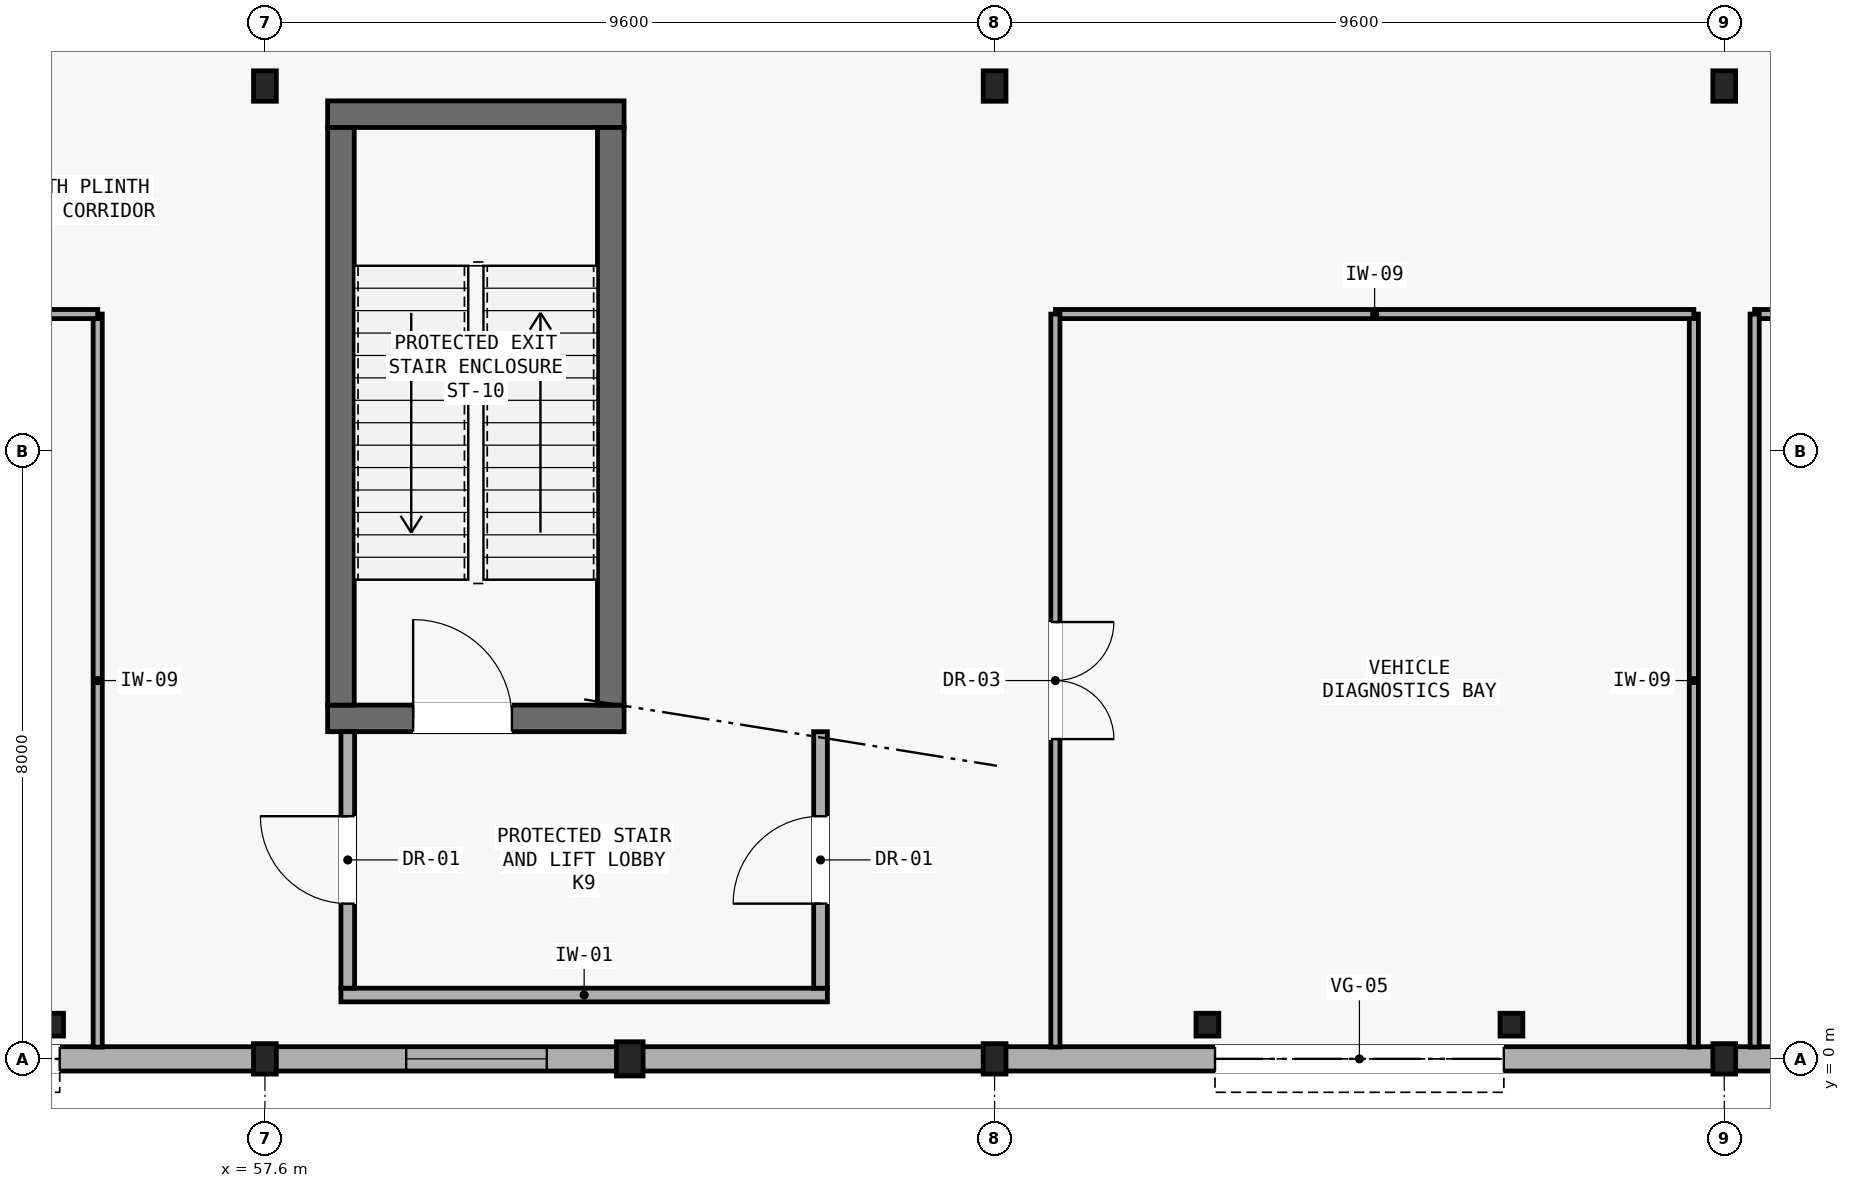
"""IFC4 building model, lengths in metres.
Left out: names, types, materials, properties, quantities, classifications, styles, units other than length and angle.
Written with IfcOpenShell. Run it as: python <this file> out.ifc"""

import sys

from ifc_helpers import new_model, si_unit, direction, frame, frame_2d, origin, origin_2d, place, context, subcontext, project, spatial, rectangle, i_section, extrude, element, fill, save


model = new_model("IFC4")
c1 = context("Model", 3, precision=1e-05, world=origin(), true_north=direction((0.0, 1.0)))
c2 = subcontext(c1, "Body", "Model", "MODEL_VIEW")
j1 = project(units=[si_unit("LENGTHUNIT", "METRE"), si_unit("PLANEANGLEUNIT", "RADIAN")], contexts=[c1])
p1 = place(None, origin())
s1 = spatial("IfcSite", under=j1, at=p1, CompositionType="ELEMENT")
p2 = place(p1, origin())
s2 = spatial("IfcBuilding", under=s1, at=p2, CompositionType="ELEMENT")
p3 = place(p2, origin())
s3 = spatial("IfcBuildingStorey", under=s2, at=p3, CompositionType="ELEMENT", Elevation=0.0)
for number, where, z_axis, x_axis in (
    (1, (57.6, 0.0, -0.27), (0.0, 0.0, 1.0), (1.0, 0.0, 0.0)),
    (2, (57.6, 12.8, -0.27), (0.0, 0.0, 1.0), (1.0, 0.0, 0.0)),
    (3, (67.2, 0.0, -0.27), (0.0, 0.0, 1.0), (1.0, 0.0, 0.0)),
    (4, (67.2, 12.8, -0.27), (0.0, 0.0, 1.0), (1.0, 0.0, 0.0)),
    (5, (76.8, 0.0, -0.27), (0.0, 0.0, 1.0), (1.0, 0.0, 0.0)),
    (6, (76.8, 12.8, -0.27), (0.0, 0.0, 1.0), (1.0, 0.0, 0.0)),
):
    element("IfcColumn", number, at=place(p3, frame(where, z_axis=z_axis, x_axis=x_axis)), inside=s3, PredefinedType="COLUMN", context=c2, shape_type="SweptSolid", body=[
        extrude(i_section(OverallWidth=0.3, OverallDepth=0.4, WebThickness=0.013, FlangeThickness=0.024, FilletRadius=0.027, at=origin_2d()), origin(), (0.0, 0.0, 1.0), 5.52),
    ])
p4 = place(p3, frame((62.4, 0.0, -0.27), z_axis=(0.0, 0.0, 1.0), x_axis=(1.0, 0.0, 0.0)))
e7 = element("IfcColumn", 7, at=p4, inside=s3, PredefinedType="PILASTER", context=c2, shape_type="SweptSolid", body=[
    extrude(rectangle(XDim=0.35, YDim=0.45, at=origin_2d()), origin(), (0.0, 0.0, 1.0), 5.27),
])
for number, where, z_axis, x_axis in (
    (8, (54.8, 0.45, -0.27), (0.0, 0.0, 1.0), (1.0, 0.0, 0.0)),
    (9, (70.0, 0.45, -0.27), (0.0, 0.0, 1.0), (1.0, 0.0, 0.0)),
    (10, (74.0, 0.45, -0.27), (0.0, 0.0, 1.0), (1.0, 0.0, 0.0)),
):
    element("IfcColumn", number, at=place(p3, frame(where, z_axis=z_axis, x_axis=x_axis)), inside=s3, PredefinedType="COLUMN", context=c2, shape_type="SweptSolid", body=[
        extrude(i_section(OverallWidth=0.3, OverallDepth=0.3, WebThickness=0.011, FlangeThickness=0.019, FilletRadius=0.027, at=origin_2d()), origin(), (0.0, 0.0, 1.0), 3.92),
    ])
p5 = place(p3, frame((48.009, 0.0, 0.0), z_axis=(0.0, 0.0, 1.0), x_axis=(1.0, 0.0, 0.0)))
e11 = element("IfcWall", 11, at=p5, inside=s3, PredefinedType="SOLIDWALL", context=c2, shape_type="SweptSolid", body=[
    extrude(rectangle(XDim=9.583, YDim=0.32, at=frame_2d((4.791, 0.0))), origin(), (0.0, 0.0, 1.0), 4.67),
])
p6 = place(p5, frame((2.691, 0.0, 0.0)))
e12 = element("IfcOpeningElement", 12, at=p6, cuts=e11, PredefinedType="OPENING", context=c2, shape_type="SweptSolid", body=[
    extrude(rectangle(XDim=4.2, YDim=3.0, at=frame_2d((2.1, 1.5))), frame((0.0, 0.17, 0.0), z_axis=(0.0, -1.0, 0.0), x_axis=(1.0, 0.0, 0.0)), (0.0, 0.0, 1.0), 0.34),
])
p7 = place(p3, frame((57.609, 0.0, 0.0), z_axis=(0.0, 0.0, 1.0), x_axis=(1.0, 0.0, 0.0)))
e13 = element("IfcWall", 13, at=p7, inside=s3, PredefinedType="SOLIDWALL", context=c2, shape_type="SweptSolid", body=[
    extrude(rectangle(XDim=9.583, YDim=0.32, at=frame_2d((4.791, 0.0))), origin(), (0.0, 0.0, 1.0), 4.67),
])
p8 = place(p7, frame((1.85, 0.0, 0.9)))
e14 = element("IfcOpeningElement", 14, at=p8, cuts=e13, PredefinedType="OPENING", context=c2, shape_type="SweptSolid", body=[
    extrude(rectangle(XDim=1.85, YDim=1.3, at=frame_2d((0.925, 0.65))), frame((0.0, 0.17, 0.0), z_axis=(0.0, -1.0, 0.0), x_axis=(1.0, 0.0, 0.0)), (0.0, 0.0, 1.0), 0.34),
])
p9 = place(p3, frame((67.209, 0.0, 0.0), z_axis=(0.0, 0.0, 1.0), x_axis=(1.0, 0.0, 0.0)))
e15 = element("IfcWall", 15, at=p9, inside=s3, PredefinedType="SOLIDWALL", context=c2, shape_type="SweptSolid", body=[
    extrude(rectangle(XDim=9.583, YDim=0.32, at=frame_2d((4.791, 0.0))), origin(), (0.0, 0.0, 1.0), 4.67),
])
p10 = place(p9, frame((2.891, 0.0, 0.0)))
e16 = element("IfcOpeningElement", 16, at=p10, cuts=e15, PredefinedType="OPENING", context=c2, shape_type="SweptSolid", body=[
    extrude(rectangle(XDim=3.8, YDim=2.95, at=frame_2d((1.9, 1.475))), frame((0.0, 0.17, 0.0), z_axis=(0.0, -1.0, 0.0), x_axis=(1.0, 0.0, 0.0)), (0.0, 0.0, 1.0), 0.34),
])
p11 = place(p3, frame((76.809, 0.0, 0.0), z_axis=(0.0, 0.0, 1.0), x_axis=(1.0, 0.0, 0.0)))
e17 = element("IfcWall", 17, at=p11, inside=s3, PredefinedType="SOLIDWALL", context=c2, shape_type="SweptSolid", body=[
    extrude(rectangle(XDim=9.583, YDim=0.32, at=frame_2d((4.791, 0.0))), origin(), (0.0, 0.0, 1.0), 4.67),
])
p12 = place(p3, frame((58.425, 4.48, -0.27), z_axis=(0.0, 0.0, 1.0), x_axis=(1.0, 0.0, 0.0)))
e18 = element("IfcWall", 18, at=p12, inside=s3, PredefinedType="SHEAR", context=c2, shape_type="SweptSolid", body=[
    extrude(rectangle(XDim=3.9, YDim=0.35, at=frame_2d((1.95, 0.0))), origin(), (0.0, 0.0, 1.0), 5.27),
])
p13 = place(p12, frame((1.125, 0.0, 0.27)))
e19 = element("IfcOpeningElement", 19, at=p13, cuts=e18, PredefinedType="OPENING", context=c2, shape_type="SweptSolid", body=[
    extrude(rectangle(XDim=1.3, YDim=2.15, at=frame_2d((0.65, 1.075))), frame((0.0, 0.185, 0.0), z_axis=(0.0, -1.0, 0.0), x_axis=(1.0, 0.0, 0.0)), (0.0, 0.0, 1.0), 0.37),
])
p14 = place(p3, frame((58.425, 12.43, -0.27), z_axis=(0.0, 0.0, 1.0), x_axis=(1.0, 0.0, 0.0)))
e20 = element("IfcWall", 20, at=p14, inside=s3, PredefinedType="SHEAR", context=c2, shape_type="SweptSolid", body=[
    extrude(rectangle(XDim=3.9, YDim=0.35, at=frame_2d((1.95, 0.0))), origin(), (0.0, 0.0, 1.0), 5.27),
])
for number, where, z_axis, x_axis in (
    (21, (58.6, 4.655, -0.27), (0.0, 0.0, 1.0), (0.0, 1.0, 0.0)),
    (22, (62.15, 4.655, -0.27), (0.0, 0.0, 1.0), (0.0, 1.0, 0.0)),
):
    element("IfcWall", number, at=place(p3, frame(where, z_axis=z_axis, x_axis=x_axis)), inside=s3, PredefinedType="SHEAR", context=c2, shape_type="SweptSolid", body=[
        extrude(rectangle(XDim=7.6, YDim=0.35, at=frame_2d((3.8, 0.0))), origin(), (0.0, 0.0, 1.0), 5.27),
    ])
p15 = place(p3, frame((58.6, 0.84, 0.0), z_axis=(0.0, 0.0, 1.0), x_axis=(1.0, 0.0, 0.0)))
e23 = element("IfcWall", 23, at=p15, inside=s3, PredefinedType="PARTITIONING", context=c2, shape_type="SweptSolid", body=[
    extrude(rectangle(XDim=6.4, YDim=0.18, at=frame_2d((3.2, 0.0))), origin(), (0.0, 0.0, 1.0), 5.0),
])
p16 = place(p3, frame((58.69, 0.93, 0.0), z_axis=(0.0, 0.0, 1.0), x_axis=(0.0, 1.0, 0.0)))
e24 = element("IfcWall", 24, at=p16, inside=s3, PredefinedType="PARTITIONING", context=c2, shape_type="SweptSolid", body=[
    extrude(rectangle(XDim=3.375, YDim=0.18, at=frame_2d((1.688, 0.0))), origin(), (0.0, 0.0, 1.0), 5.0),
])
p17 = place(p16, frame((1.113, 0.0, 0.0)))
e25 = element("IfcOpeningElement", 25, at=p17, cuts=e24, PredefinedType="OPENING", context=c2, shape_type="SweptSolid", body=[
    extrude(rectangle(XDim=1.15, YDim=2.15, at=frame_2d((0.575, 1.075))), frame((0.0, 0.1, 0.0), z_axis=(0.0, -1.0, 0.0), x_axis=(1.0, 0.0, 0.0)), (0.0, 0.0, 1.0), 0.2),
])
p18 = place(p3, frame((64.91, 0.93, 0.0), z_axis=(0.0, 0.0, 1.0), x_axis=(0.0, 1.0, 0.0)))
e26 = element("IfcWall", 26, at=p18, inside=s3, PredefinedType="PARTITIONING", context=c2, shape_type="SweptSolid", body=[
    extrude(rectangle(XDim=3.375, YDim=0.18, at=frame_2d((1.688, 0.0))), origin(), (0.0, 0.0, 1.0), 5.0),
])
p19 = place(p18, frame((1.113, 0.0, 0.0)))
e27 = element("IfcOpeningElement", 27, at=p19, cuts=e26, PredefinedType="OPENING", context=c2, shape_type="SweptSolid", body=[
    extrude(rectangle(XDim=1.15, YDim=2.15, at=frame_2d((0.575, 1.075))), frame((0.0, 0.1, 0.0), z_axis=(0.0, -1.0, 0.0), x_axis=(1.0, 0.0, 0.0)), (0.0, 0.0, 1.0), 0.2),
])
p20 = place(p3, frame((55.4, 0.155, 0.0), z_axis=(0.0, 0.0, 1.0), x_axis=(0.0, 1.0, 0.0)))
e28 = element("IfcWall", 28, at=p20, inside=s3, PredefinedType="PARTITIONING", context=c2, shape_type="SweptSolid", body=[
    extrude(rectangle(XDim=9.645, YDim=0.12, at=frame_2d((4.823, 0.0))), origin(), (0.0, 0.0, 1.0), 5.0),
])
p21 = place(p3, frame((55.4, 9.8, 0.0), z_axis=(0.0, 0.0, 1.0), x_axis=(-1.0, 0.0, 0.0)))
e29 = element("IfcWall", 29, at=p21, inside=s3, PredefinedType="PARTITIONING", context=c2, shape_type="SweptSolid", body=[
    extrude(rectangle(XDim=16.6, YDim=0.12, at=frame_2d((8.3, 0.0))), origin(), (0.0, 0.0, 1.0), 5.0),
])
p22 = place(p21, frame((7.53, 0.0, 0.0)))
e30 = element("IfcOpeningElement", 30, at=p22, cuts=e29, PredefinedType="OPENING", context=c2, shape_type="SweptSolid", body=[
    extrude(rectangle(XDim=1.54, YDim=2.2, at=frame_2d((0.77, 1.1))), frame((0.0, 0.07, 0.0), z_axis=(0.0, -1.0, 0.0), x_axis=(1.0, 0.0, 0.0)), (0.0, 0.0, 1.0), 0.14),
])
p23 = place(p3, frame((76.4, 0.155, 0.0), z_axis=(0.0, 0.0, 1.0), x_axis=(0.0, 1.0, 0.0)))
e31 = element("IfcWall", 31, at=p23, inside=s3, PredefinedType="PARTITIONING", context=c2, shape_type="SweptSolid", body=[
    extrude(rectangle(XDim=9.645, YDim=0.12, at=frame_2d((4.823, 0.0))), origin(), (0.0, 0.0, 1.0), 5.0),
])
p24 = place(p3, frame((76.4, 9.8, 0.0), z_axis=(0.0, 0.0, 1.0), x_axis=(-1.0, 0.0, 0.0)))
e32 = element("IfcWall", 32, at=p24, inside=s3, PredefinedType="PARTITIONING", context=c2, shape_type="SweptSolid", body=[
    extrude(rectangle(XDim=8.4, YDim=0.12, at=frame_2d((4.2, 0.0))), origin(), (0.0, 0.0, 1.0), 5.0),
])
p25 = place(p3, frame((68.0, 9.8, 0.0), z_axis=(0.0, 0.0, 1.0), x_axis=(0.0, -1.0, 0.0)))
e33 = element("IfcWall", 33, at=p25, inside=s3, PredefinedType="PARTITIONING", context=c2, shape_type="SweptSolid", body=[
    extrude(rectangle(XDim=9.645, YDim=0.12, at=frame_2d((4.823, 0.0))), origin(), (0.0, 0.0, 1.0), 5.0),
])
p26 = place(p25, frame((4.052, 0.0, 0.0)))
e34 = element("IfcOpeningElement", 34, at=p26, cuts=e33, PredefinedType="OPENING", context=c2, shape_type="SweptSolid", body=[
    extrude(rectangle(XDim=1.54, YDim=2.2, at=frame_2d((0.77, 1.1))), frame((0.0, 0.07, 0.0), z_axis=(0.0, -1.0, 0.0), x_axis=(1.0, 0.0, 0.0)), (0.0, 0.0, 1.0), 0.14),
])
p27 = place(p3, frame((116.4, 9.8, 0.0), z_axis=(0.0, 0.0, 1.0), x_axis=(-1.0, 0.0, 0.0)))
e35 = element("IfcWall", 35, at=p27, inside=s3, PredefinedType="PARTITIONING", context=c2, shape_type="SweptSolid", body=[
    extrude(rectangle(XDim=39.2, YDim=0.12, at=frame_2d((19.6, 0.0))), origin(), (0.0, 0.0, 1.0), 5.0),
])
p28 = place(p27, frame((18.83, 0.0, 0.0)))
e36 = element("IfcOpeningElement", 36, at=p28, cuts=e35, PredefinedType="OPENING", context=c2, shape_type="SweptSolid", body=[
    extrude(rectangle(XDim=1.54, YDim=2.2, at=frame_2d((0.77, 1.1))), frame((0.0, 0.07, 0.0), z_axis=(0.0, -1.0, 0.0), x_axis=(1.0, 0.0, 0.0)), (0.0, 0.0, 1.0), 0.14),
])
p29 = place(p3, frame((77.2, 9.8, 0.0), z_axis=(0.0, 0.0, 1.0), x_axis=(0.0, -1.0, 0.0)))
e37 = element("IfcWall", 37, at=p29, inside=s3, PredefinedType="PARTITIONING", context=c2, shape_type="SweptSolid", body=[
    extrude(rectangle(XDim=9.645, YDim=0.12, at=frame_2d((4.823, 0.0))), origin(), (0.0, 0.0, 1.0), 5.0),
])
p30 = place(p6, frame((4.2, 0.0, 0.0), z_axis=(0.0, 0.0, 1.0), x_axis=(-1.0, 0.0, 0.0)))
e38 = element("IfcDoor", 38, at=p30, inside=s3, OperationType="SINGLE_SWING_LEFT", PredefinedType="USERDEFINED", context=c2, shape_type="SweptSolid", body=[
    extrude(rectangle(XDim=4.2, YDim=3.0, at=frame_2d((2.1, 1.5))), frame((0.0, 0.025, 0.0), z_axis=(0.0, -1.0, 0.0), x_axis=(1.0, 0.0, 0.0)), (0.0, 0.0, 1.0), 0.05),
])
fill(e12, e38)
p31 = place(p8, origin())
e39 = element("IfcWindow", 39, at=p31, inside=s3, PartitioningType="SINGLE_PANEL", PredefinedType="WINDOW", context=c2, shape_type="SweptSolid", body=[
    extrude(rectangle(XDim=1.85, YDim=1.3, at=frame_2d((0.925, 0.65))), frame((0.0, 0.03, 0.0), z_axis=(0.0, -1.0, 0.0), x_axis=(1.0, 0.0, 0.0)), (0.0, 0.0, 1.0), 0.06),
])
fill(e14, e39)
p32 = place(p10, frame((3.8, 0.0, 0.0), z_axis=(0.0, 0.0, 1.0), x_axis=(-1.0, 0.0, 0.0)))
e40 = element("IfcDoor", 40, at=p32, inside=s3, OperationType="SINGLE_SWING_LEFT", PredefinedType="USERDEFINED", context=c2, shape_type="SweptSolid", body=[
    extrude(rectangle(XDim=3.8, YDim=2.95, at=frame_2d((1.9, 1.475))), frame((0.0, 0.025, 0.0), z_axis=(0.0, -1.0, 0.0), x_axis=(1.0, 0.0, 0.0)), (0.0, 0.0, 1.0), 0.05),
])
fill(e16, e40)
p33 = place(p13, origin())
e41 = element("IfcDoor", 41, at=p33, inside=s3, OperationType="SINGLE_SWING_LEFT", PredefinedType="DOOR", context=c2, shape_type="SweptSolid", body=[
    extrude(rectangle(XDim=1.3, YDim=2.15, at=frame_2d((0.65, 1.075))), frame((0.0, 0.025, 0.0), z_axis=(0.0, -1.0, 0.0), x_axis=(1.0, 0.0, 0.0)), (0.0, 0.0, 1.0), 0.05),
])
fill(e19, e41)
p34 = place(p17, origin())
e42 = element("IfcDoor", 42, at=p34, inside=s3, OperationType="SINGLE_SWING_RIGHT", PredefinedType="DOOR", context=c2, shape_type="SweptSolid", body=[
    extrude(rectangle(XDim=1.15, YDim=2.15, at=frame_2d((0.575, 1.075))), frame((0.0, 0.025, 0.0), z_axis=(0.0, -1.0, 0.0), x_axis=(1.0, 0.0, 0.0)), (0.0, 0.0, 1.0), 0.05),
])
fill(e25, e42)
p35 = place(p19, origin())
e43 = element("IfcDoor", 43, at=p35, inside=s3, OperationType="SINGLE_SWING_LEFT", PredefinedType="DOOR", context=c2, shape_type="SweptSolid", body=[
    extrude(rectangle(XDim=1.15, YDim=2.15, at=frame_2d((0.575, 1.075))), frame((0.0, 0.025, 0.0), z_axis=(0.0, -1.0, 0.0), x_axis=(1.0, 0.0, 0.0)), (0.0, 0.0, 1.0), 0.05),
])
fill(e27, e43)
p36 = place(p26, origin())
e44 = element("IfcDoor", 44, at=p36, inside=s3, OperationType="DOUBLE_DOOR_SINGLE_SWING", PredefinedType="DOOR", context=c2, shape_type="SweptSolid", body=[
    extrude(rectangle(XDim=1.54, YDim=2.2, at=frame_2d((0.77, 1.1))), frame((0.0, 0.025, 0.0), z_axis=(0.0, -1.0, 0.0), x_axis=(1.0, 0.0, 0.0)), (0.0, 0.0, 1.0), 0.05),
])
fill(e34, e44)
save(model, sys.argv[1])
